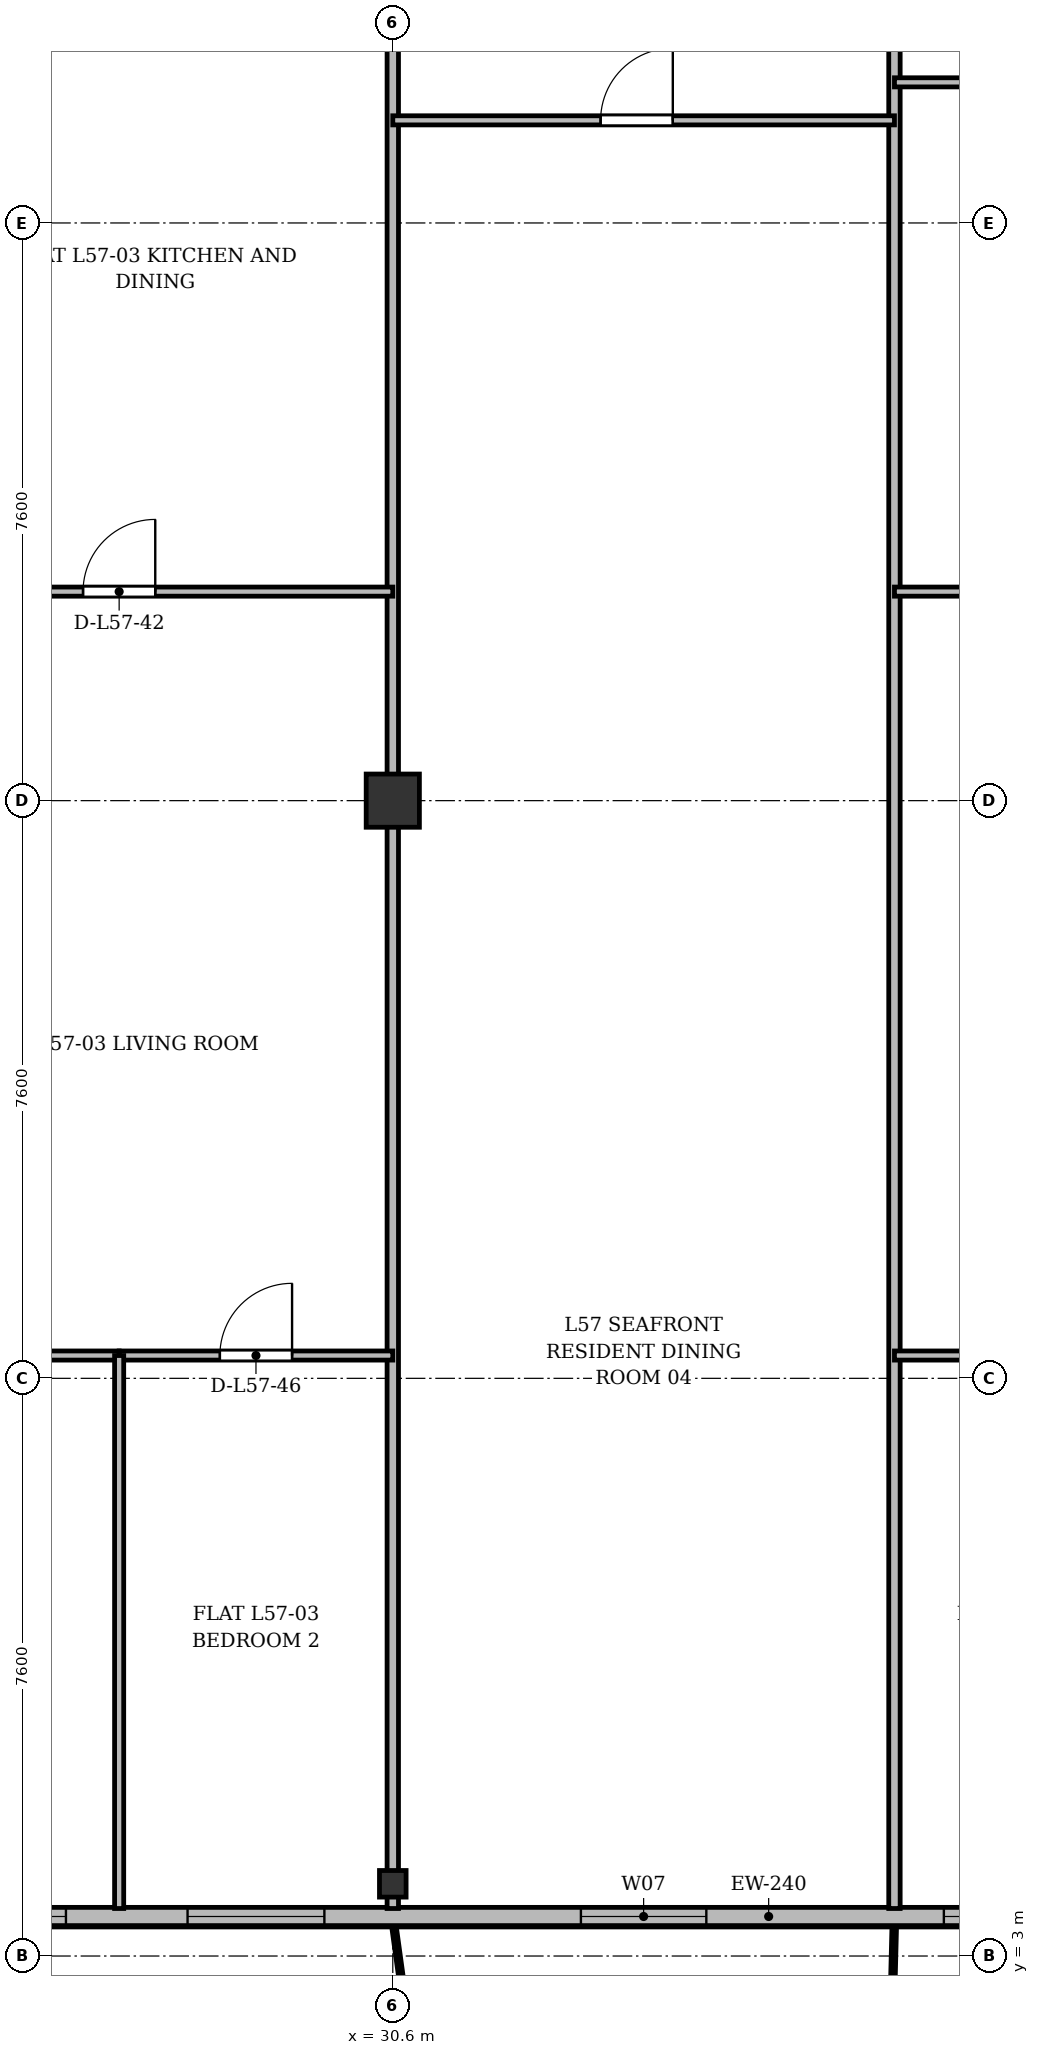
"""IFC4 building model, lengths in metres.
Left out: names, types, materials, properties, quantities, classifications, styles, units other than length and angle.
Written with IfcOpenShell. Run it as: python <this file> out.ifc"""

import sys

from ifc_helpers import new_model, si_unit, direction, frame, frame_2d, origin, origin_2d, place, context, subcontext, project, spatial, rectangle, i_section, extrude, source, transform, mapped, element, fill, save


model = new_model("IFC4")
c1 = context("Model", 3, precision=1e-05, world=origin(), true_north=direction((0.0, 1.0)))
c2 = subcontext(c1, "Body", "Model", "MODEL_VIEW")
j1 = project(units=[si_unit("LENGTHUNIT", "METRE"), si_unit("PLANEANGLEUNIT", "RADIAN")], contexts=[c1])
p1 = place(None, origin())
s1 = spatial("IfcSite", under=j1, at=p1, CompositionType="ELEMENT")
p2 = place(p1, origin())
s2 = spatial("IfcBuilding", under=s1, at=p2, CompositionType="ELEMENT")
p3 = place(p2, frame((0.0, 0.0, 219.3)))
s3 = spatial("IfcBuildingStorey", under=s2, at=p3, CompositionType="ELEMENT", Elevation=219.3)
m1 = source(origin(), c2, "Body", "SweptSolid", [
    extrude(i_section(OverallWidth=0.35, OverallDepth=0.35, WebThickness=0.018, FlangeThickness=0.028, at=origin_2d()), origin(), (0.0, 0.0, 1.0), 3.6),
])
p4 = place(p3, frame((30.6, 3.95, 0.0), z_axis=(0.0, 0.0, 1.0), x_axis=(1.0, 0.0, 0.0)))
e1 = element("IfcColumn", 1, at=p4, inside=s3, PredefinedType="COLUMN", context=c2, shape_type="MappedRepresentation", body=[
    mapped(m1, transform((0.0, 0.0, 0.0), x_axis=(1.0, 0.0, 0.0), y_axis=(0.0, 1.0, 0.0), z_axis=(0.0, 0.0, 1.0), scale=1.0)),
])
m2 = source(origin(), c2, "Body", "SweptSolid", [
    extrude(rectangle(XDim=0.7, YDim=0.7, at=origin_2d()), origin(), (0.0, 0.0, 1.0), 3.6),
])
p5 = place(p3, frame((30.6, 18.2, 0.0), z_axis=(0.0, 0.0, 1.0), x_axis=(1.0, 0.0, 0.0)))
e2 = element("IfcColumn", 2, at=p5, inside=s3, PredefinedType="COLUMN", context=c2, shape_type="MappedRepresentation", body=[
    mapped(m2, transform((0.0, 0.0, 0.0), x_axis=(1.0, 0.0, 0.0), y_axis=(0.0, 1.0, 0.0), z_axis=(0.0, 0.0, 1.0), scale=1.0)),
])
p6 = place(p3, frame((63.4, 3.52, 0.0), z_axis=(0.0, 0.0, 1.0), x_axis=(-1.0, 0.0, 0.0)))
e3 = element("IfcWall", 3, at=p6, inside=s3, PredefinedType="SOLIDWALL", context=c2, shape_type="SweptSolid", body=[
    extrude(rectangle(XDim=52.4, YDim=0.24, at=frame_2d((26.2, 0.0))), origin(), (0.0, 0.0, 1.0), 3.36),
])
p7 = place(p6, frame((1.595, 0.0, 0.9)))
e4 = element("IfcOpeningElement", 4, at=p7, cuts=e3, PredefinedType="OPENING", context=c2, shape_type="SweptSolid", body=[
    extrude(rectangle(XDim=1.5, YDim=1.75, at=frame_2d((0.75, 0.875))), frame((0.0, 0.13, 0.0), z_axis=(0.0, -1.0, 0.0), x_axis=(1.0, 0.0, 0.0)), (0.0, 0.0, 1.0), 0.26),
])
p8 = place(p6, frame((7.5, 0.0, 0.9)))
e5 = element("IfcOpeningElement", 5, at=p8, cuts=e3, PredefinedType="OPENING", context=c2, shape_type="SweptSolid", body=[
    extrude(rectangle(XDim=2.0, YDim=1.95, at=frame_2d((1.0, 0.975))), frame((0.0, 0.13, 0.0), z_axis=(0.0, -1.0, 0.0), x_axis=(1.0, 0.0, 0.0)), (0.0, 0.0, 1.0), 0.26),
])
p9 = place(p6, frame((13.42, 0.0, 0.0)))
e6 = element("IfcOpeningElement", 6, at=p9, cuts=e3, PredefinedType="OPENING", context=c2, shape_type="SweptSolid", body=[
    extrude(rectangle(XDim=1.2, YDim=2.2, at=frame_2d((0.6, 1.1))), frame((0.0, 0.13, 0.0), z_axis=(0.0, -1.0, 0.0), x_axis=(1.0, 0.0, 0.0)), (0.0, 0.0, 1.0), 0.26),
])
p10 = place(p6, frame((15.1, 0.0, 0.9)))
e7 = element("IfcOpeningElement", 7, at=p10, cuts=e3, PredefinedType="OPENING", context=c2, shape_type="SweptSolid", body=[
    extrude(rectangle(XDim=1.8, YDim=1.8, at=frame_2d((0.9, 0.9))), frame((0.0, 0.13, 0.0), z_axis=(0.0, -1.0, 0.0), x_axis=(1.0, 0.0, 0.0)), (0.0, 0.0, 1.0), 0.26),
])
p11 = place(p6, frame((17.65, 0.0, 0.9)))
e8 = element("IfcOpeningElement", 8, at=p11, cuts=e3, PredefinedType="OPENING", context=c2, shape_type="SweptSolid", body=[
    extrude(rectangle(XDim=1.5, YDim=1.75, at=frame_2d((0.75, 0.875))), frame((0.0, 0.13, 0.0), z_axis=(0.0, -1.0, 0.0), x_axis=(1.0, 0.0, 0.0)), (0.0, 0.0, 1.0), 0.26),
])
p12 = place(p6, frame((20.5, 0.0, 0.9)))
e9 = element("IfcOpeningElement", 9, at=p12, cuts=e3, PredefinedType="OPENING", context=c2, shape_type="SweptSolid", body=[
    extrude(rectangle(XDim=1.5, YDim=1.75, at=frame_2d((0.75, 0.875))), frame((0.0, 0.13, 0.0), z_axis=(0.0, -1.0, 0.0), x_axis=(1.0, 0.0, 0.0)), (0.0, 0.0, 1.0), 0.26),
])
p13 = place(p6, frame((23.55, 0.0, 0.9)))
e10 = element("IfcOpeningElement", 10, at=p13, cuts=e3, PredefinedType="OPENING", context=c2, shape_type="SweptSolid", body=[
    extrude(rectangle(XDim=2.0, YDim=1.95, at=frame_2d((1.0, 0.975))), frame((0.0, 0.13, 0.0), z_axis=(0.0, -1.0, 0.0), x_axis=(1.0, 0.0, 0.0)), (0.0, 0.0, 1.0), 0.26),
])
p14 = place(p6, frame((28.675, 0.0, 0.9)))
e11 = element("IfcOpeningElement", 11, at=p14, cuts=e3, PredefinedType="OPENING", context=c2, shape_type="SweptSolid", body=[
    extrude(rectangle(XDim=1.65, YDim=1.85, at=frame_2d((0.825, 0.925))), frame((0.0, 0.13, 0.0), z_axis=(0.0, -1.0, 0.0), x_axis=(1.0, 0.0, 0.0)), (0.0, 0.0, 1.0), 0.26),
])
p15 = place(p6, frame((33.7, 0.0, 0.9)))
e12 = element("IfcOpeningElement", 12, at=p15, cuts=e3, PredefinedType="OPENING", context=c2, shape_type="SweptSolid", body=[
    extrude(rectangle(XDim=1.8, YDim=1.8, at=frame_2d((0.9, 0.9))), frame((0.0, 0.13, 0.0), z_axis=(0.0, -1.0, 0.0), x_axis=(1.0, 0.0, 0.0)), (0.0, 0.0, 1.0), 0.26),
])
p16 = place(p6, frame((37.1, 0.0, 0.9)))
e13 = element("IfcOpeningElement", 13, at=p16, cuts=e3, PredefinedType="OPENING", context=c2, shape_type="SweptSolid", body=[
    extrude(rectangle(XDim=2.2, YDim=1.8, at=frame_2d((1.1, 0.9))), frame((0.0, 0.13, 0.0), z_axis=(0.0, -1.0, 0.0), x_axis=(1.0, 0.0, 0.0)), (0.0, 0.0, 1.0), 0.26),
])
p17 = place(p6, frame((41.09, 0.0, 0.0)))
e14 = element("IfcOpeningElement", 14, at=p17, cuts=e3, PredefinedType="OPENING", context=c2, shape_type="SweptSolid", body=[
    extrude(rectangle(XDim=1.2, YDim=2.2, at=frame_2d((0.6, 1.1))), frame((0.0, 0.13, 0.0), z_axis=(0.0, -1.0, 0.0), x_axis=(1.0, 0.0, 0.0)), (0.0, 0.0, 1.0), 0.26),
])
p18 = place(p6, frame((42.9, 0.0, 0.9)))
e15 = element("IfcOpeningElement", 15, at=p18, cuts=e3, PredefinedType="OPENING", context=c2, shape_type="SweptSolid", body=[
    extrude(rectangle(XDim=2.0, YDim=1.95, at=frame_2d((1.0, 0.975))), frame((0.0, 0.13, 0.0), z_axis=(0.0, -1.0, 0.0), x_axis=(1.0, 0.0, 0.0)), (0.0, 0.0, 1.0), 0.26),
])
p19 = place(p6, frame((45.675, 0.0, 0.9)))
e16 = element("IfcOpeningElement", 16, at=p19, cuts=e3, PredefinedType="OPENING", context=c2, shape_type="SweptSolid", body=[
    extrude(rectangle(XDim=1.65, YDim=1.85, at=frame_2d((0.825, 0.925))), frame((0.0, 0.13, 0.0), z_axis=(0.0, -1.0, 0.0), x_axis=(1.0, 0.0, 0.0)), (0.0, 0.0, 1.0), 0.26),
])
p20 = place(p6, frame((49.155, 0.0, 0.9)))
e17 = element("IfcOpeningElement", 17, at=p20, cuts=e3, PredefinedType="OPENING", context=c2, shape_type="SweptSolid", body=[
    extrude(rectangle(XDim=1.8, YDim=1.8, at=frame_2d((0.9, 0.9))), frame((0.0, 0.13, 0.0), z_axis=(0.0, -1.0, 0.0), x_axis=(1.0, 0.0, 0.0)), (0.0, 0.0, 1.0), 0.26),
])
p21 = place(p3, frame((30.6, 3.625, 0.0), z_axis=(0.0, 0.0, 1.0), x_axis=(0.0, 1.0, 0.0)))
e18 = element("IfcWall", 18, at=p21, inside=s3, PredefinedType="PARTITIONING", context=c2, shape_type="SweptSolid", body=[
    extrude(rectangle(XDim=27.375, YDim=0.15, at=frame_2d((13.688, 0.0))), origin(), (0.0, 0.0, 1.0), 2.86),
])
p22 = place(p3, frame((37.2, 3.625, 0.0), z_axis=(0.0, 0.0, 1.0), x_axis=(0.0, 1.0, 0.0)))
e19 = element("IfcWall", 19, at=p22, inside=s3, PredefinedType="PARTITIONING", context=c2, shape_type="SweptSolid", body=[
    extrude(rectangle(XDim=27.375, YDim=0.15, at=frame_2d((13.688, 0.0))), origin(), (0.0, 0.0, 1.0), 2.91),
])
p23 = place(p3, frame((23.4, 20.95, 0.0), z_axis=(0.0, 0.0, 1.0), x_axis=(1.0, 0.0, 0.0)))
e20 = element("IfcWall", 20, at=p23, inside=s3, PredefinedType="PARTITIONING", context=c2, shape_type="SweptSolid", body=[
    extrude(rectangle(XDim=7.2, YDim=0.12, at=frame_2d((3.6, 0.0))), origin(), (0.0, 0.0, 1.0), 2.86),
])
p24 = place(p23, frame((3.125, 0.0, 0.0)))
e21 = element("IfcOpeningElement", 21, at=p24, cuts=e20, PredefinedType="OPENING", context=c2, shape_type="SweptSolid", body=[
    extrude(rectangle(XDim=0.95, YDim=2.15, at=frame_2d((0.475, 1.075))), frame((0.0, 0.07, 0.0), z_axis=(0.0, -1.0, 0.0), x_axis=(1.0, 0.0, 0.0)), (0.0, 0.0, 1.0), 0.14),
])
p25 = place(p3, frame((23.4, 10.9, 0.0), z_axis=(0.0, 0.0, 1.0), x_axis=(1.0, 0.0, 0.0)))
e22 = element("IfcWall", 22, at=p25, inside=s3, PredefinedType="PARTITIONING", context=c2, shape_type="SweptSolid", body=[
    extrude(rectangle(XDim=3.6, YDim=0.12, at=frame_2d((1.8, 0.0))), origin(), (0.0, 0.0, 1.0), 2.86),
])
p26 = place(p25, frame((1.325, 0.0, 0.0)))
e23 = element("IfcOpeningElement", 23, at=p26, cuts=e22, PredefinedType="OPENING", context=c2, shape_type="SweptSolid", body=[
    extrude(rectangle(XDim=0.95, YDim=2.15, at=frame_2d((0.475, 1.075))), frame((0.0, 0.07, 0.0), z_axis=(0.0, -1.0, 0.0), x_axis=(1.0, 0.0, 0.0)), (0.0, 0.0, 1.0), 0.14),
])
p27 = place(p3, frame((27.0, 10.9, 0.0), z_axis=(0.0, 0.0, 1.0), x_axis=(1.0, 0.0, 0.0)))
e24 = element("IfcWall", 24, at=p27, inside=s3, PredefinedType="PARTITIONING", context=c2, shape_type="SweptSolid", body=[
    extrude(rectangle(XDim=3.6, YDim=0.12, at=frame_2d((1.8, 0.0))), origin(), (0.0, 0.0, 1.0), 2.86),
])
p28 = place(p27, frame((1.325, 0.0, 0.0)))
e25 = element("IfcOpeningElement", 25, at=p28, cuts=e24, PredefinedType="OPENING", context=c2, shape_type="SweptSolid", body=[
    extrude(rectangle(XDim=0.95, YDim=2.15, at=frame_2d((0.475, 1.075))), frame((0.0, 0.07, 0.0), z_axis=(0.0, -1.0, 0.0), x_axis=(1.0, 0.0, 0.0)), (0.0, 0.0, 1.0), 0.14),
])
p29 = place(p3, frame((27.0, 3.625, 0.0), z_axis=(0.0, 0.0, 1.0), x_axis=(0.0, 1.0, 0.0)))
e26 = element("IfcWall", 26, at=p29, inside=s3, PredefinedType="PARTITIONING", context=c2, shape_type="SweptSolid", body=[
    extrude(rectangle(XDim=7.275, YDim=0.12, at=frame_2d((3.637, 0.0))), origin(), (0.0, 0.0, 1.0), 2.91),
])
p30 = place(p3, frame((30.6, 27.15, 0.0), z_axis=(0.0, 0.0, 1.0), x_axis=(1.0, 0.0, 0.0)))
e27 = element("IfcWall", 27, at=p30, inside=s3, PredefinedType="PARTITIONING", context=c2, shape_type="SweptSolid", body=[
    extrude(rectangle(XDim=6.6, YDim=0.12, at=frame_2d((3.3, 0.0))), origin(), (0.0, 0.0, 1.0), 2.86),
])
p31 = place(p30, frame((2.734, 0.0, 0.0)))
e28 = element("IfcOpeningElement", 28, at=p31, cuts=e27, PredefinedType="OPENING", context=c2, shape_type="SweptSolid", body=[
    extrude(rectangle(XDim=0.95, YDim=2.15, at=frame_2d((0.475, 1.075))), frame((0.0, 0.07, 0.0), z_axis=(0.0, -1.0, 0.0), x_axis=(1.0, 0.0, 0.0)), (0.0, 0.0, 1.0), 0.14),
])
p32 = place(p3, frame((37.2, 20.95, 0.0), z_axis=(0.0, 0.0, 1.0), x_axis=(1.0, 0.0, 0.0)))
e29 = element("IfcWall", 29, at=p32, inside=s3, PredefinedType="PARTITIONING", context=c2, shape_type="SweptSolid", body=[
    extrude(rectangle(XDim=6.6, YDim=0.12, at=frame_2d((3.3, 0.0))), origin(), (0.0, 0.0, 1.0), 2.86),
])
p33 = place(p32, frame((2.734, 0.0, 0.0)))
e30 = element("IfcOpeningElement", 30, at=p33, cuts=e29, PredefinedType="OPENING", context=c2, shape_type="SweptSolid", body=[
    extrude(rectangle(XDim=0.95, YDim=2.15, at=frame_2d((0.475, 1.075))), frame((0.0, 0.07, 0.0), z_axis=(0.0, -1.0, 0.0), x_axis=(1.0, 0.0, 0.0)), (0.0, 0.0, 1.0), 0.14),
])
p34 = place(p3, frame((37.2, 27.65, 0.0), z_axis=(0.0, 0.0, 1.0), x_axis=(1.0, 0.0, 0.0)))
e31 = element("IfcWall", 31, at=p34, inside=s3, PredefinedType="PARTITIONING", context=c2, shape_type="SweptSolid", body=[
    extrude(rectangle(XDim=2.294, YDim=0.12, at=frame_2d((1.147, 0.0))), origin(), (0.0, 0.0, 1.0), 3.36),
])
p35 = place(p3, frame((37.2, 10.9, 0.0), z_axis=(0.0, 0.0, 1.0), x_axis=(1.0, 0.0, 0.0)))
e32 = element("IfcWall", 32, at=p35, inside=s3, PredefinedType="PARTITIONING", context=c2, shape_type="SweptSolid", body=[
    extrude(rectangle(XDim=3.3, YDim=0.12, at=frame_2d((1.65, 0.0))), origin(), (0.0, 0.0, 1.0), 3.06),
])
p36 = place(p35, frame((1.175, 0.0, 0.0)))
e33 = element("IfcOpeningElement", 33, at=p36, cuts=e32, PredefinedType="OPENING", context=c2, shape_type="SweptSolid", body=[
    extrude(rectangle(XDim=0.95, YDim=2.15, at=frame_2d((0.475, 1.075))), frame((0.0, 0.07, 0.0), z_axis=(0.0, -1.0, 0.0), x_axis=(1.0, 0.0, 0.0)), (0.0, 0.0, 1.0), 0.14),
])
m3 = source(origin(), c2, "Body", "SweptSolid", [
    extrude(rectangle(XDim=2.0, YDim=1.95, at=frame_2d((1.0, 0.975))), frame((0.0, 0.03, 0.0), z_axis=(0.0, -1.0, 0.0), x_axis=(1.0, 0.0, 0.0)), (0.0, 0.0, 1.0), 0.06),
])
p37 = place(p13, origin())
e34 = element("IfcWindow", 34, at=p37, inside=s3, PartitioningType="SINGLE_PANEL", PredefinedType="WINDOW", context=c2, shape_type="MappedRepresentation", body=[
    mapped(m3, transform((0.0, 0.0, 0.0), x_axis=(1.0, 0.0, 0.0), y_axis=(0.0, 1.0, 0.0), z_axis=(0.0, 0.0, 1.0), scale=1.0)),
])
fill(e10, e34)
m4 = source(origin(), c2, "Body", "SweptSolid", [
    extrude(rectangle(XDim=1.65, YDim=1.85, at=frame_2d((0.825, 0.925))), frame((0.0, 0.03, 0.0), z_axis=(0.0, -1.0, 0.0), x_axis=(1.0, 0.0, 0.0)), (0.0, 0.0, 1.0), 0.06),
])
p38 = place(p14, origin())
e35 = element("IfcWindow", 35, at=p38, inside=s3, PartitioningType="SINGLE_PANEL", PredefinedType="WINDOW", context=c2, shape_type="MappedRepresentation", body=[
    mapped(m4, transform((0.0, 0.0, 0.0), x_axis=(1.0, 0.0, 0.0), y_axis=(0.0, 1.0, 0.0), z_axis=(0.0, 0.0, 1.0), scale=1.0)),
])
fill(e11, e35)
m5 = source(origin(), c2, "Body", "SweptSolid", [
    extrude(rectangle(XDim=1.8, YDim=1.8, at=frame_2d((0.9, 0.9))), frame((0.0, 0.03, 0.0), z_axis=(0.0, -1.0, 0.0), x_axis=(1.0, 0.0, 0.0)), (0.0, 0.0, 1.0), 0.06),
])
p39 = place(p15, origin())
e36 = element("IfcWindow", 36, at=p39, inside=s3, PartitioningType="SINGLE_PANEL", PredefinedType="WINDOW", context=c2, shape_type="MappedRepresentation", body=[
    mapped(m5, transform((0.0, 0.0, 0.0), x_axis=(1.0, 0.0, 0.0), y_axis=(0.0, 1.0, 0.0), z_axis=(0.0, 0.0, 1.0), scale=1.0)),
])
fill(e12, e36)
m6 = source(origin(), c2, "Body", "SweptSolid", [
    extrude(rectangle(XDim=2.2, YDim=1.8, at=frame_2d((1.1, 0.9))), frame((0.0, 0.03, 0.0), z_axis=(0.0, -1.0, 0.0), x_axis=(1.0, 0.0, 0.0)), (0.0, 0.0, 1.0), 0.06),
])
p40 = place(p16, origin())
e37 = element("IfcWindow", 37, at=p40, inside=s3, PartitioningType="SINGLE_PANEL", PredefinedType="WINDOW", context=c2, shape_type="MappedRepresentation", body=[
    mapped(m6, transform((0.0, 0.0, 0.0), x_axis=(1.0, 0.0, 0.0), y_axis=(0.0, 1.0, 0.0), z_axis=(0.0, 0.0, 1.0), scale=1.0)),
])
fill(e13, e37)
m7 = source(origin(), c2, "Body", "SweptSolid", [
    extrude(rectangle(XDim=0.95, YDim=2.15, at=frame_2d((0.475, 1.075))), frame((0.0, 0.025, 0.0), z_axis=(0.0, -1.0, 0.0), x_axis=(1.0, 0.0, 0.0)), (0.0, 0.0, 1.0), 0.05),
])
p41 = place(p24, origin())
e38 = element("IfcDoor", 38, at=p41, inside=s3, OperationType="SINGLE_SWING_RIGHT", PredefinedType="DOOR", context=c2, shape_type="MappedRepresentation", body=[
    mapped(m7, transform((0.0, 0.0, 0.0), x_axis=(1.0, 0.0, 0.0), y_axis=(0.0, 1.0, 0.0), z_axis=(0.0, 0.0, 1.0), scale=1.0)),
])
fill(e21, e38)
p42 = place(p28, origin())
e39 = element("IfcDoor", 39, at=p42, inside=s3, OperationType="SINGLE_SWING_RIGHT", PredefinedType="DOOR", context=c2, shape_type="MappedRepresentation", body=[
    mapped(m7, transform((0.0, 0.0, 0.0), x_axis=(1.0, 0.0, 0.0), y_axis=(0.0, 1.0, 0.0), z_axis=(0.0, 0.0, 1.0), scale=1.0)),
])
fill(e25, e39)
p43 = place(p31, origin())
e40 = element("IfcDoor", 40, at=p43, inside=s3, OperationType="SINGLE_SWING_RIGHT", PredefinedType="DOOR", context=c2, shape_type="MappedRepresentation", body=[
    mapped(m7, transform((0.0, 0.0, 0.0), x_axis=(1.0, 0.0, 0.0), y_axis=(0.0, 1.0, 0.0), z_axis=(0.0, 0.0, 1.0), scale=1.0)),
])
fill(e28, e40)
save(model, sys.argv[1])
